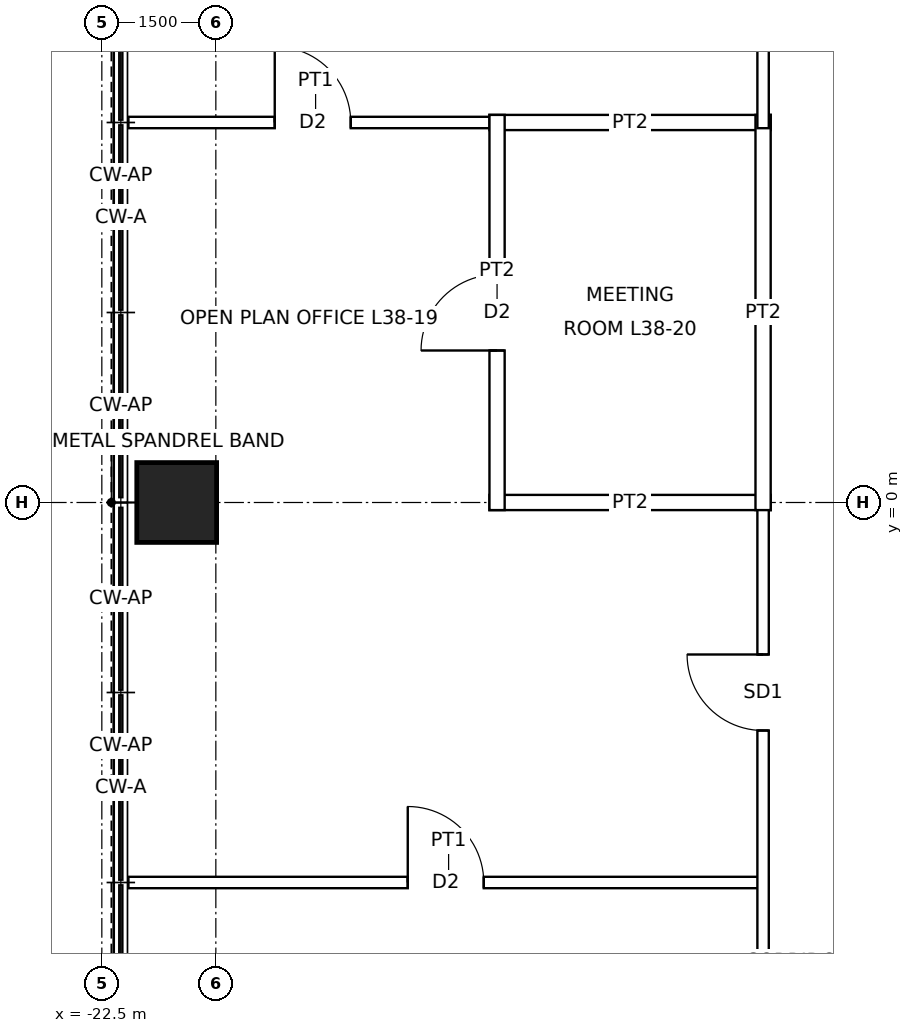
"""IFC4 building model, lengths in metres.
Left out: names, types, materials, properties, quantities, classifications, styles, units other than length and angle.
Written with IfcOpenShell. Run it as: python <this file> out.ifc"""

import sys

from ifc_helpers import new_model, si_unit, direction, frame, frame_2d, origin, origin_2d, place, context, subcontext, project, spatial, rectangle, hollow_rectangle, extrude, element, fill, save


model = new_model("IFC4")
c1 = context("Model", 3, precision=1e-05, world=origin(), true_north=direction((0.0, 1.0)))
c2 = subcontext(c1, "Body", "Model", "MODEL_VIEW")
j1 = project(units=[si_unit("LENGTHUNIT", "METRE"), si_unit("PLANEANGLEUNIT", "RADIAN")], contexts=[c1])
p1 = place(None, origin())
s1 = spatial("IfcSite", under=j1, at=p1, CompositionType="ELEMENT")
p2 = place(p1, origin())
s2 = spatial("IfcBuilding", under=s1, at=p2, CompositionType="ELEMENT")
p3 = place(p2, frame((0.0, 0.0, 185.9)))
s3 = spatial("IfcBuildingStorey", under=s2, at=p3, CompositionType="ELEMENT", Elevation=185.9)
p4 = place(p3, frame((-21.515, 0.0, 0.0), z_axis=(0.0, 0.0, 1.0), x_axis=(1.0, 0.0, 0.0)))
e1 = element("IfcColumn", 1, at=p4, inside=s3, PredefinedType="COLUMN", context=c2, shape_type="SweptSolid", body=[
    extrude(hollow_rectangle(XDim=1.05, YDim=1.05, WallThickness=0.07, at=origin_2d()), origin(), (0.0, 0.0, 1.0), 4.0),
])
p5 = place(p3, frame((-22.15, -5.0, 0.0), z_axis=(0.0, 0.0, 1.0), x_axis=(1.0, 0.0, 0.0)))
e2 = element("IfcWall", 2, at=p5, inside=s3, PredefinedType="PARTITIONING", context=c2, shape_type="SweptSolid", body=[
    extrude(rectangle(XDim=8.425, YDim=0.15, at=frame_2d((4.212, 0.0))), origin(), (0.0, 0.0, 1.0), 3.85),
])
p6 = place(p5, frame((3.675, 0.0, 0.0)))
e3 = element("IfcOpeningElement", 3, at=p6, cuts=e2, PredefinedType="OPENING", context=c2, shape_type="SweptSolid", body=[
    extrude(rectangle(XDim=1.0, YDim=2.1, at=frame_2d((0.5, 1.05))), frame((0.0, 0.085, 0.0), z_axis=(0.0, -1.0, 0.0), x_axis=(1.0, 0.0, 0.0)), (0.0, 0.0, 1.0), 0.17),
])
p7 = place(p3, frame((-17.4, 0.0, 0.0), z_axis=(0.0, 0.0, 1.0), x_axis=(1.0, 0.0, 0.0)))
e4 = element("IfcWall", 4, at=p7, inside=s3, PredefinedType="PARTITIONING", context=c2, shape_type="SweptSolid", body=[
    extrude(rectangle(XDim=3.7, YDim=0.2, at=frame_2d((1.85, 0.0))), origin(), (0.0, 0.0, 1.0), 3.238),
])
p8 = place(p3, frame((-22.15, 5.0, 0.0), z_axis=(0.0, 0.0, 1.0), x_axis=(1.0, 0.0, 0.0)))
e5 = element("IfcWall", 5, at=p8, inside=s3, PredefinedType="PARTITIONING", context=c2, shape_type="SweptSolid", body=[
    extrude(rectangle(XDim=4.925, YDim=0.15, at=frame_2d((2.462, 0.0))), origin(), (0.0, 0.0, 1.0), 3.85),
])
p9 = place(p8, frame((1.925, 0.0, 0.0)))
e6 = element("IfcOpeningElement", 6, at=p9, cuts=e5, PredefinedType="OPENING", context=c2, shape_type="SweptSolid", body=[
    extrude(rectangle(XDim=1.0, YDim=2.1, at=frame_2d((0.5, 1.05))), frame((0.0, 0.085, 0.0), z_axis=(0.0, -1.0, 0.0), x_axis=(1.0, 0.0, 0.0)), (0.0, 0.0, 1.0), 0.17),
])
p10 = place(p3, frame((-17.4, 5.0, 0.0), z_axis=(0.0, 0.0, 1.0), x_axis=(1.0, 0.0, 0.0)))
e7 = element("IfcWall", 7, at=p10, inside=s3, PredefinedType="PARTITIONING", context=c2, shape_type="SweptSolid", body=[
    extrude(rectangle(XDim=3.7, YDim=0.2, at=frame_2d((1.85, 0.0))), origin(), (0.0, 0.0, 1.0), 3.85),
])
p11 = place(p3, frame((-17.3, -0.1, 0.0), z_axis=(0.0, 0.0, 1.0), x_axis=(0.0, 1.0, 0.0)))
e8 = element("IfcWall", 8, at=p11, inside=s3, PredefinedType="PARTITIONING", context=c2, shape_type="SweptSolid", body=[
    extrude(rectangle(XDim=5.2, YDim=0.2, at=frame_2d((2.6, 0.0))), origin(), (0.0, 0.0, 1.0), 3.85),
])
p12 = place(p11, frame((2.1, 0.0, 0.0)))
e9 = element("IfcOpeningElement", 9, at=p12, cuts=e8, PredefinedType="OPENING", context=c2, shape_type="SweptSolid", body=[
    extrude(rectangle(XDim=1.0, YDim=2.1, at=frame_2d((0.5, 1.05))), frame((0.0, 0.11, 0.0), z_axis=(0.0, -1.0, 0.0), x_axis=(1.0, 0.0, 0.0)), (0.0, 0.0, 1.0), 0.22),
])
p13 = place(p3, frame((-13.8, -13.875, 0.0), z_axis=(0.0, 0.0, 1.0), x_axis=(0.0, 1.0, 0.0)))
e10 = element("IfcWall", 10, at=p13, inside=s3, PredefinedType="PARTITIONING", context=c2, shape_type="SweptSolid", body=[
    extrude(rectangle(XDim=13.95, YDim=0.15, at=frame_2d((6.975, 0.0))), origin(), (0.0, 0.0, 1.0), 3.85),
])
p14 = place(p13, frame((10.875, 0.0, 0.0)))
e11 = element("IfcOpeningElement", 11, at=p14, cuts=e10, PredefinedType="OPENING", context=c2, shape_type="SweptSolid", body=[
    extrude(rectangle(XDim=1.0, YDim=2.4, at=frame_2d((0.5, 1.2))), frame((0.0, 0.085, 0.0), z_axis=(0.0, -1.0, 0.0), x_axis=(1.0, 0.0, 0.0)), (0.0, 0.0, 1.0), 0.17),
])
p15 = place(p3, frame((-13.8, -0.1, 0.0), z_axis=(0.0, 0.0, 1.0), x_axis=(0.0, 1.0, 0.0)))
e12 = element("IfcWall", 12, at=p15, inside=s3, PredefinedType="PARTITIONING", context=c2, shape_type="SweptSolid", body=[
    extrude(rectangle(XDim=5.2, YDim=0.2, at=frame_2d((2.6, 0.0))), origin(), (0.0, 0.0, 1.0), 3.85),
])
p16 = place(p3, frame((-13.8, 4.925, 0.0), z_axis=(0.0, 0.0, 1.0), x_axis=(0.0, 1.0, 0.0)))
e13 = element("IfcWall", 13, at=p16, inside=s3, PredefinedType="PARTITIONING", context=c2, shape_type="SweptSolid", body=[
    extrude(rectangle(XDim=7.15, YDim=0.15, at=frame_2d((3.575, 0.0))), origin(), (0.0, 0.0, 1.0), 3.85),
])
p17 = place(p16, frame((5.533, 0.0, 0.0)))
e14 = element("IfcOpeningElement", 14, at=p17, cuts=e13, PredefinedType="OPENING", context=c2, shape_type="SweptSolid", body=[
    extrude(rectangle(XDim=1.0, YDim=2.4, at=frame_2d((0.5, 1.2))), frame((0.0, 0.085, 0.0), z_axis=(0.0, -1.0, 0.0), x_axis=(1.0, 0.0, 0.0)), (0.0, 0.0, 1.0), 0.17),
])
p18 = place(p6, origin())
e15 = element("IfcDoor", 15, at=p18, inside=s3, OperationType="SINGLE_SWING_LEFT", PredefinedType="DOOR", context=c2, shape_type="SweptSolid", body=[
    extrude(rectangle(XDim=1.0, YDim=2.1, at=frame_2d((0.5, 1.05))), frame((0.0, 0.025, 0.0), z_axis=(0.0, -1.0, 0.0), x_axis=(1.0, 0.0, 0.0)), (0.0, 0.0, 1.0), 0.05),
])
fill(e3, e15)
p19 = place(p14, origin())
e16 = element("IfcDoor", 16, at=p19, inside=s3, OperationType="SINGLE_SWING_RIGHT", PredefinedType="DOOR", context=c2, shape_type="SweptSolid", body=[
    extrude(rectangle(XDim=1.0, YDim=2.4, at=frame_2d((0.5, 1.2))), frame((0.0, 0.025, 0.0), z_axis=(0.0, -1.0, 0.0), x_axis=(1.0, 0.0, 0.0)), (0.0, 0.0, 1.0), 0.05),
])
fill(e11, e16)
p20 = place(p12, origin())
e17 = element("IfcDoor", 17, at=p20, inside=s3, OperationType="SINGLE_SWING_LEFT", PredefinedType="DOOR", context=c2, shape_type="SweptSolid", body=[
    extrude(rectangle(XDim=1.0, YDim=2.1, at=frame_2d((0.5, 1.05))), frame((0.0, 0.025, 0.0), z_axis=(0.0, -1.0, 0.0), x_axis=(1.0, 0.0, 0.0)), (0.0, 0.0, 1.0), 0.05),
])
fill(e9, e17)
p21 = place(p9, origin())
e18 = element("IfcDoor", 18, at=p21, inside=s3, OperationType="SINGLE_SWING_LEFT", PredefinedType="DOOR", context=c2, shape_type="SweptSolid", body=[
    extrude(rectangle(XDim=1.0, YDim=2.1, at=frame_2d((0.5, 1.05))), frame((0.0, 0.025, 0.0), z_axis=(0.0, -1.0, 0.0), x_axis=(1.0, 0.0, 0.0)), (0.0, 0.0, 1.0), 0.05),
])
fill(e6, e18)
save(model, sys.argv[1])
